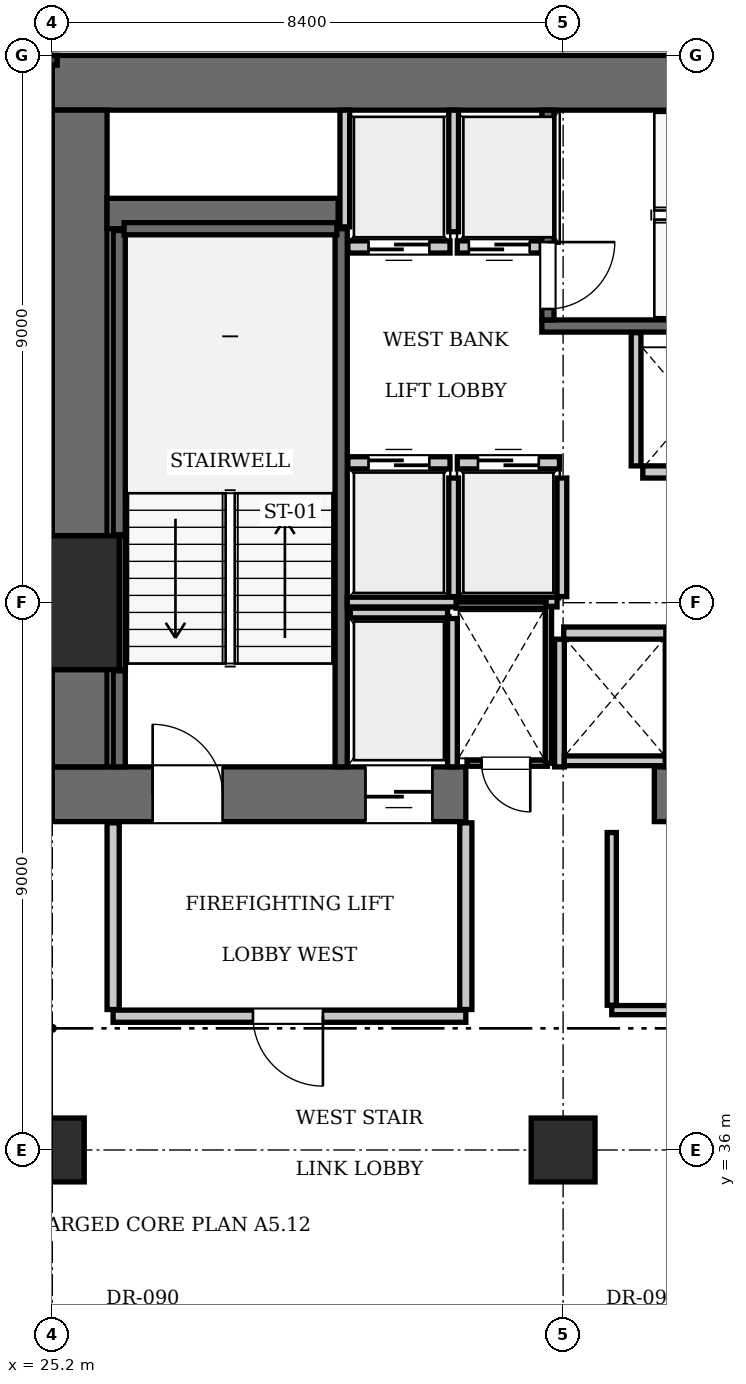
"""IFC4 building model, lengths in metres.
Left out: names, types, materials, properties, quantities, classifications, styles, units other than length and angle.
Written with IfcOpenShell. Run it as: python <this file> out.ifc"""

import sys

from ifc_helpers import new_model, si_unit, direction, frame, frame_2d, origin, origin_2d, place, context, subcontext, project, spatial, rectangle, extrude, element, fill, save


model = new_model("IFC4")
c1 = context("Model", 3, precision=1e-05, world=origin(), true_north=direction((0.0, 1.0)))
c2 = subcontext(c1, "Body", "Model", "MODEL_VIEW")
j1 = project(units=[si_unit("LENGTHUNIT", "METRE"), si_unit("PLANEANGLEUNIT", "RADIAN")], contexts=[c1])
p1 = place(None, origin())
s1 = spatial("IfcSite", under=j1, at=p1, CompositionType="ELEMENT")
p2 = place(p1, origin())
s2 = spatial("IfcBuilding", under=s1, at=p2, CompositionType="ELEMENT")
p3 = place(p2, frame((0.0, 0.0, 42.35)))
s3 = spatial("IfcBuildingStorey", under=s2, at=p3, CompositionType="ELEMENT", Elevation=42.35)
p4 = place(p3, frame((25.2, 45.0, 0.0), z_axis=(0.0, 0.0, 1.0), x_axis=(1.0, 0.0, 0.0)))
e1 = element("IfcColumn", 1, at=p4, inside=s3, PredefinedType="COLUMN", context=c2, shape_type="SweptSolid", body=[
    extrude(rectangle(XDim=2.2, YDim=2.2, at=origin_2d()), origin(), (0.0, 0.0, 1.0), 3.85),
])
p5 = place(p3, frame((25.2, 53.55, 0.0), z_axis=(0.0, 0.0, 1.0), x_axis=(1.0, 0.0, 0.0)))
e2 = element("IfcWall", 2, at=p5, inside=s3, PredefinedType="SHEAR", context=c2, shape_type="SweptSolid", body=[
    extrude(rectangle(XDim=25.2, YDim=0.9, at=frame_2d((12.6, 0.0))), origin(), (0.0, 0.0, 1.0), 3.85),
])
p6 = place(p3, frame((25.2, 41.85, 0.0), z_axis=(0.0, 0.0, 1.0), x_axis=(1.0, 0.0, 0.0)))
e3 = element("IfcWall", 3, at=p6, inside=s3, PredefinedType="SHEAR", context=c2, shape_type="SweptSolid", body=[
    extrude(rectangle(XDim=6.8, YDim=0.9, at=frame_2d((3.4, 0.0))), origin(), (0.0, 0.0, 1.0), 3.85),
])
p7 = place(p6, frame((1.65, 0.0, 0.0)))
e4 = element("IfcOpeningElement", 4, at=p7, cuts=e3, PredefinedType="OPENING", context=c2, shape_type="SweptSolid", body=[
    extrude(rectangle(XDim=1.15, YDim=2.15, at=frame_2d((0.575, 1.075))), frame((0.0, 0.46, 0.0), z_axis=(0.0, -1.0, 0.0), x_axis=(1.0, 0.0, 0.0)), (0.0, 0.0, 1.0), 0.92),
])
p8 = place(p6, frame((5.15, 0.0, 0.0)))
e5 = element("IfcOpeningElement", 5, at=p8, cuts=e3, PredefinedType="OPENING", context=c2, shape_type="SweptSolid", body=[
    extrude(rectangle(XDim=1.1, YDim=2.2, at=frame_2d((0.55, 1.1))), frame((0.0, 0.46, 0.0), z_axis=(0.0, -1.0, 0.0), x_axis=(1.0, 0.0, 0.0)), (0.0, 0.0, 1.0), 0.92),
])
p9 = place(p3, frame((35.1, 41.85, 0.0), z_axis=(0.0, 0.0, 1.0), x_axis=(1.0, 0.0, 0.0)))
e6 = element("IfcWall", 6, at=p9, inside=s3, PredefinedType="SHEAR", context=c2, shape_type="SweptSolid", body=[
    extrude(rectangle(XDim=5.4, YDim=0.9, at=frame_2d((2.7, 0.0))), origin(), (0.0, 0.0, 1.0), 3.85),
])
p10 = place(p3, frame((25.65, 42.3, 0.0), z_axis=(0.0, 0.0, 1.0), x_axis=(0.0, 1.0, 0.0)))
e7 = element("IfcWall", 7, at=p10, inside=s3, PredefinedType="SHEAR", context=c2, shape_type="SweptSolid", body=[
    extrude(rectangle(XDim=1.6, YDim=0.9, at=frame_2d((0.8, 0.0))), origin(), (0.0, 0.0, 1.0), 3.85),
])
p11 = place(p3, frame((25.65, 46.1, 0.0), z_axis=(0.0, 0.0, 1.0), x_axis=(0.0, 1.0, 0.0)))
e8 = element("IfcWall", 8, at=p11, inside=s3, PredefinedType="SHEAR", context=c2, shape_type="SweptSolid", body=[
    extrude(rectangle(XDim=7.0, YDim=0.9, at=frame_2d((3.5, 0.0))), origin(), (0.0, 0.0, 1.0), 3.85),
])
p12 = place(p3, frame((26.1, 51.4, 0.0), z_axis=(0.0, 0.0, 1.0), x_axis=(1.0, 0.0, 0.0)))
e9 = element("IfcWall", 9, at=p12, inside=s3, PredefinedType="SHEAR", context=c2, shape_type="SweptSolid", body=[
    extrude(rectangle(XDim=3.8, YDim=0.5, at=frame_2d((1.9, 0.0))), origin(), (0.0, 0.0, 1.0), 3.85),
])
for number, where, z_axis, x_axis in (
    (10, (25.2, 36.0, 0.0), (0.0, 0.0, 1.0), (1.0, 0.0, 0.0)),
    (11, (33.6, 36.0, 0.0), (0.0, 0.0, 1.0), (1.0, 0.0, 0.0)),
):
    element("IfcColumn", number, at=place(p3, frame(where, z_axis=z_axis, x_axis=x_axis)), inside=s3, PredefinedType="COLUMN", context=c2, shape_type="SweptSolid", body=[
        extrude(rectangle(XDim=1.05, YDim=1.05, at=origin_2d()), origin(), (0.0, 0.0, 1.0), 3.85),
    ])
p13 = place(p3, frame((29.95, 42.3, 0.0), z_axis=(0.0, 0.0, 1.0), x_axis=(0.0, 1.0, 0.0)))
e12 = element("IfcWall", 12, at=p13, inside=s3, PredefinedType="SOLIDWALL", context=c2, shape_type="SweptSolid", body=[
    extrude(rectangle(XDim=8.85, YDim=0.2, at=frame_2d((4.425, 0.0))), origin(), (0.0, 0.0, 1.0), 3.61),
])
p14 = place(p3, frame((26.3, 42.3, 0.0), z_axis=(0.0, 0.0, 1.0), x_axis=(0.0, 1.0, 0.0)))
e13 = element("IfcWall", 13, at=p14, inside=s3, PredefinedType="SOLIDWALL", context=c2, shape_type="SweptSolid", body=[
    extrude(rectangle(XDim=1.58, YDim=0.2, at=frame_2d((0.79, 0.0))), origin(), (0.0, 0.0, 1.0), 3.61),
])
p15 = place(p3, frame((26.3, 46.12, 0.0), z_axis=(0.0, 0.0, 1.0), x_axis=(0.0, 1.0, 0.0)))
e14 = element("IfcWall", 14, at=p15, inside=s3, PredefinedType="SOLIDWALL", context=c2, shape_type="SweptSolid", body=[
    extrude(rectangle(XDim=5.0, YDim=0.2, at=frame_2d((2.5, 0.0))), origin(), (0.0, 0.0, 1.0), 3.61),
])
p16 = place(p3, frame((26.38, 51.15, 0.0), z_axis=(0.0, 0.0, 1.0), x_axis=(1.0, 0.0, 0.0)))
e15 = element("IfcWall", 15, at=p16, inside=s3, PredefinedType="SOLIDWALL", context=c2, shape_type="SweptSolid", body=[
    extrude(rectangle(XDim=3.5, YDim=0.2, at=frame_2d((1.75, 0.0))), origin(), (0.0, 0.0, 1.0), 3.61),
])
p17 = place(p3, frame((26.352, 43.9, 0.0), z_axis=(0.0, 0.0, 1.0), x_axis=(0.0, 1.0, 0.0)))
e16 = element("IfcWall", 16, at=p17, inside=s3, PredefinedType="SOLIDWALL", context=c2, shape_type="SweptSolid", body=[
    extrude(rectangle(XDim=2.2, YDim=0.1, at=frame_2d((1.1, 0.0))), origin(), (0.0, 0.0, 1.0), 3.61),
])
p18 = place(p3, frame((33.25, 49.55, 0.0), z_axis=(0.0, 0.0, 1.0), x_axis=(1.0, 0.0, 0.0)))
e17 = element("IfcWall", 17, at=p18, inside=s3, PredefinedType="SOLIDWALL", context=c2, shape_type="SweptSolid", body=[
    extrude(rectangle(XDim=9.1, YDim=0.2, at=frame_2d((4.55, 0.0))), origin(), (0.0, 0.0, 1.0), 3.61),
])
p19 = place(p3, frame((33.35, 49.65, 0.0), z_axis=(0.0, 0.0, 1.0), x_axis=(0.0, 1.0, 0.0)))
e18 = element("IfcWall", 18, at=p19, inside=s3, PredefinedType="SOLIDWALL", context=c2, shape_type="SweptSolid", body=[
    extrude(rectangle(XDim=3.45, YDim=0.2, at=frame_2d((1.725, 0.0))), origin(), (0.0, 0.0, 1.0), 3.61),
])
p20 = place(p19, frame((0.18, 0.0, 0.0)))
e19 = element("IfcOpeningElement", 19, at=p20, cuts=e18, PredefinedType="OPENING", context=c2, shape_type="SweptSolid", body=[
    extrude(rectangle(XDim=1.1, YDim=2.15, at=frame_2d((0.55, 1.075))), frame((0.0, 0.11, 0.0), z_axis=(0.0, -1.0, 0.0), x_axis=(1.0, 0.0, 0.0)), (0.0, 0.0, 1.0), 0.22),
])
p21 = place(p3, frame((30.06, 47.3, 0.0), z_axis=(0.0, 0.0, 1.0), x_axis=(1.0, 0.0, 0.0)))
e20 = element("IfcWall", 20, at=p21, inside=s3, PredefinedType="SOLIDWALL", context=c2, shape_type="SweptSolid", body=[
    extrude(rectangle(XDim=1.68, YDim=0.2, at=frame_2d((0.84, 0.0))), origin(), (0.0, 0.0, 1.0), 3.61),
])
p22 = place(p21, frame((0.34, 0.0, 0.0)))
e21 = element("IfcOpeningElement", 21, at=p22, cuts=e20, PredefinedType="OPENING", context=c2, shape_type="SweptSolid", body=[
    extrude(rectangle(XDim=1.0, YDim=2.15, at=frame_2d((0.5, 1.075))), frame((0.0, 0.11, 0.0), z_axis=(0.0, -1.0, 0.0), x_axis=(1.0, 0.0, 0.0)), (0.0, 0.0, 1.0), 0.22),
])
p23 = place(p3, frame((31.86, 47.3, 0.0), z_axis=(0.0, 0.0, 1.0), x_axis=(1.0, 0.0, 0.0)))
e22 = element("IfcWall", 22, at=p23, inside=s3, PredefinedType="SOLIDWALL", context=c2, shape_type="SweptSolid", body=[
    extrude(rectangle(XDim=1.68, YDim=0.2, at=frame_2d((0.84, 0.0))), origin(), (0.0, 0.0, 1.0), 3.61),
])
p24 = place(p23, frame((0.34, 0.0, 0.0)))
e23 = element("IfcOpeningElement", 23, at=p24, cuts=e22, PredefinedType="OPENING", context=c2, shape_type="SweptSolid", body=[
    extrude(rectangle(XDim=1.0, YDim=2.15, at=frame_2d((0.5, 1.075))), frame((0.0, 0.11, 0.0), z_axis=(0.0, -1.0, 0.0), x_axis=(1.0, 0.0, 0.0)), (0.0, 0.0, 1.0), 0.22),
])
p25 = place(p3, frame((30.06, 50.85, 0.0), z_axis=(0.0, 0.0, 1.0), x_axis=(1.0, 0.0, 0.0)))
e24 = element("IfcWall", 24, at=p25, inside=s3, PredefinedType="SOLIDWALL", context=c2, shape_type="SweptSolid", body=[
    extrude(rectangle(XDim=1.68, YDim=0.2, at=frame_2d((0.84, 0.0))), origin(), (0.0, 0.0, 1.0), 3.61),
])
p26 = place(p25, frame((0.34, 0.0, 0.0)))
e25 = element("IfcOpeningElement", 25, at=p26, cuts=e24, PredefinedType="OPENING", context=c2, shape_type="SweptSolid", body=[
    extrude(rectangle(XDim=1.0, YDim=2.15, at=frame_2d((0.5, 1.075))), frame((0.0, 0.11, 0.0), z_axis=(0.0, -1.0, 0.0), x_axis=(1.0, 0.0, 0.0)), (0.0, 0.0, 1.0), 0.22),
])
p27 = place(p3, frame((31.86, 50.85, 0.0), z_axis=(0.0, 0.0, 1.0), x_axis=(1.0, 0.0, 0.0)))
e26 = element("IfcWall", 26, at=p27, inside=s3, PredefinedType="SOLIDWALL", context=c2, shape_type="SweptSolid", body=[
    extrude(rectangle(XDim=1.38, YDim=0.2, at=frame_2d((0.69, 0.0))), origin(), (0.0, 0.0, 1.0), 3.61),
])
p28 = place(p27, frame((0.19, 0.0, 0.0)))
e27 = element("IfcOpeningElement", 27, at=p28, cuts=e26, PredefinedType="OPENING", context=c2, shape_type="SweptSolid", body=[
    extrude(rectangle(XDim=1.0, YDim=2.15, at=frame_2d((0.5, 1.075))), frame((0.0, 0.11, 0.0), z_axis=(0.0, -1.0, 0.0), x_axis=(1.0, 0.0, 0.0)), (0.0, 0.0, 1.0), 0.22),
])
p29 = place(p3, frame((34.91, 47.15, 0.0), z_axis=(0.0, 0.0, 1.0), x_axis=(1.0, 0.0, 0.0)))
e28 = element("IfcWall", 28, at=p29, inside=s3, PredefinedType="SOLIDWALL", context=c2, shape_type="SweptSolid", body=[
    extrude(rectangle(XDim=1.68, YDim=0.2, at=frame_2d((0.84, 0.0))), origin(), (0.0, 0.0, 1.0), 3.61),
])
p30 = place(p3, frame((33.61, 44.5, 0.0), z_axis=(0.0, 0.0, 1.0), x_axis=(1.0, 0.0, 0.0)))
e29 = element("IfcWall", 29, at=p30, inside=s3, PredefinedType="SOLIDWALL", context=c2, shape_type="SweptSolid", body=[
    extrude(rectangle(XDim=1.68, YDim=0.2, at=frame_2d((0.84, 0.0))), origin(), (0.0, 0.0, 1.0), 3.61),
])
p31 = place(p3, frame((30.1, 44.83, 0.0), z_axis=(0.0, 0.0, 1.0), x_axis=(1.0, 0.0, 0.0)))
e30 = element("IfcWall", 30, at=p31, inside=s3, PredefinedType="SOLIDWALL", context=c2, shape_type="SweptSolid", body=[
    extrude(rectangle(XDim=1.6, YDim=0.16, at=frame_2d((0.8, 0.0))), origin(), (0.0, 0.0, 1.0), 3.61),
])
p32 = place(p3, frame((31.78, 42.3, 0.0), z_axis=(0.0, 0.0, 1.0), x_axis=(0.0, 1.0, 0.0)))
e31 = element("IfcWall", 31, at=p32, inside=s3, PredefinedType="SOLIDWALL", context=c2, shape_type="SweptSolid", body=[
    extrude(rectangle(XDim=2.44, YDim=0.16, at=frame_2d((1.22, 0.0))), origin(), (0.0, 0.0, 1.0), 3.61),
])
for number, where, z_axis, x_axis in (
    (32, (31.8, 45.1, 0.0), (0.0, 0.0, 1.0), (0.0, 1.0, 0.0)),
    (33, (33.58, 45.1, 0.0), (0.0, 0.0, 1.0), (0.0, 1.0, 0.0)),
):
    element("IfcWall", number, at=place(p3, frame(where, z_axis=z_axis, x_axis=x_axis)), inside=s3, PredefinedType="SOLIDWALL", context=c2, shape_type="SweptSolid", body=[
        extrude(rectangle(XDim=1.95, YDim=0.16, at=frame_2d((0.975, 0.0))), origin(), (0.0, 0.0, 1.0), 3.61),
    ])
p33 = place(p3, frame((30.05, 45.01, 0.0), z_axis=(0.0, 0.0, 1.0), x_axis=(1.0, 0.0, 0.0)))
e34 = element("IfcWall", 34, at=p33, inside=s3, PredefinedType="SOLIDWALL", context=c2, shape_type="SweptSolid", body=[
    extrude(rectangle(XDim=3.45, YDim=0.16, at=frame_2d((1.725, 0.0))), origin(), (0.0, 0.0, 1.0), 3.61),
])
p34 = place(p3, frame((30.01, 51.18, 0.0), z_axis=(0.0, 0.0, 1.0), x_axis=(0.0, 1.0, 0.0)))
e35 = element("IfcWall", 35, at=p34, inside=s3, PredefinedType="SOLIDWALL", context=c2, shape_type="SweptSolid", body=[
    extrude(rectangle(XDim=1.92, YDim=0.16, at=frame_2d((0.96, 0.0))), origin(), (0.0, 0.0, 1.0), 3.61),
])
p35 = place(p3, frame((31.8, 51.1, 0.0), z_axis=(0.0, 0.0, 1.0), x_axis=(0.0, 1.0, 0.0)))
e36 = element("IfcWall", 36, at=p35, inside=s3, PredefinedType="SOLIDWALL", context=c2, shape_type="SweptSolid", body=[
    extrude(rectangle(XDim=2.0, YDim=0.16, at=frame_2d((1.0, 0.0))), origin(), (0.0, 0.0, 1.0), 3.61),
])
p36 = place(p3, frame((34.8, 47.25, 0.0), z_axis=(0.0, 0.0, 1.0), x_axis=(0.0, 1.0, 0.0)))
e37 = element("IfcWall", 37, at=p36, inside=s3, PredefinedType="SOLIDWALL", context=c2, shape_type="SweptSolid", body=[
    extrude(rectangle(XDim=2.19, YDim=0.16, at=frame_2d((1.095, 0.0))), origin(), (0.0, 0.0, 1.0), 3.61),
])
for number, where, z_axis, x_axis in (
    (38, (33.54, 42.3, 0.0), (0.0, 0.0, 1.0), (0.0, 1.0, 0.0)),
    (39, (35.36, 42.3, 0.0), (0.0, 0.0, 1.0), (0.0, 1.0, 0.0)),
):
    element("IfcWall", number, at=place(p3, frame(where, z_axis=z_axis, x_axis=x_axis)), inside=s3, PredefinedType="SOLIDWALL", context=c2, shape_type="SweptSolid", body=[
        extrude(rectangle(XDim=2.1, YDim=0.16, at=frame_2d((1.05, 0.0))), origin(), (0.0, 0.0, 1.0), 3.61),
    ])
p37 = place(p3, frame((33.62, 42.4, 0.0), z_axis=(0.0, 0.0, 1.0), x_axis=(1.0, 0.0, 0.0)))
e40 = element("IfcWall", 40, at=p37, inside=s3, PredefinedType="SOLIDWALL", context=c2, shape_type="SweptSolid", body=[
    extrude(rectangle(XDim=1.66, YDim=0.16, at=frame_2d((0.83, 0.0))), origin(), (0.0, 0.0, 1.0), 3.61),
])
p38 = place(p3, frame((26.2, 38.2, 0.0), z_axis=(0.0, 0.0, 1.0), x_axis=(1.0, 0.0, 0.0)))
e41 = element("IfcWall", 41, at=p38, inside=s3, PredefinedType="PARTITIONING", context=c2, shape_type="SweptSolid", body=[
    extrude(rectangle(XDim=5.8, YDim=0.2, at=frame_2d((2.9, 0.0))), origin(), (0.0, 0.0, 1.0), 3.61),
])
p39 = place(p38, frame((2.3, 0.0, 0.0)))
e42 = element("IfcOpeningElement", 42, at=p39, cuts=e41, PredefinedType="OPENING", context=c2, shape_type="SweptSolid", body=[
    extrude(rectangle(XDim=1.15, YDim=2.15, at=frame_2d((0.575, 1.075))), frame((0.0, 0.11, 0.0), z_axis=(0.0, -1.0, 0.0), x_axis=(1.0, 0.0, 0.0)), (0.0, 0.0, 1.0), 0.22),
])
for number, where, z_axis, x_axis in (
    (43, (26.2, 38.31, 0.0), (0.0, 0.0, 1.0), (0.0, 1.0, 0.0)),
    (44, (32.0, 38.31, 0.0), (0.0, 0.0, 1.0), (0.0, 1.0, 0.0)),
):
    element("IfcWall", number, at=place(p3, frame(where, z_axis=z_axis, x_axis=x_axis)), inside=s3, PredefinedType="PARTITIONING", context=c2, shape_type="SweptSolid", body=[
        extrude(rectangle(XDim=3.07, YDim=0.2, at=frame_2d((1.535, 0.0))), origin(), (0.0, 0.0, 1.0), 3.61),
    ])
p40 = place(p3, frame((32.02, 42.36, 0.0), z_axis=(0.0, 0.0, 1.0), x_axis=(1.0, 0.0, 0.0)))
e45 = element("IfcWall", 45, at=p40, inside=s3, PredefinedType="PARTITIONING", context=c2, shape_type="SweptSolid", body=[
    extrude(rectangle(XDim=1.32, YDim=0.1, at=frame_2d((0.66, 0.0))), origin(), (0.0, 0.0, 1.0), 3.61),
])
p41 = place(p40, frame((0.24, 0.0, 0.0)))
e46 = element("IfcOpeningElement", 46, at=p41, cuts=e45, PredefinedType="OPENING", context=c2, shape_type="SweptSolid", body=[
    extrude(rectangle(XDim=0.8, YDim=2.05, at=frame_2d((0.4, 1.025))), frame((0.0, 0.06, 0.0), z_axis=(0.0, -1.0, 0.0), x_axis=(1.0, 0.0, 0.0)), (0.0, 0.0, 1.0), 0.12),
])
p42 = place(p3, frame((31.84, 44.96, 0.0), z_axis=(0.0, 0.0, 1.0), x_axis=(1.0, 0.0, 0.0)))
e47 = element("IfcWall", 47, at=p42, inside=s3, PredefinedType="PARTITIONING", context=c2, shape_type="SweptSolid", body=[
    extrude(rectangle(XDim=1.48, YDim=0.1, at=frame_2d((0.74, 0.0))), origin(), (0.0, 0.0, 1.0), 3.61),
])
p43 = place(p3, frame((33.36, 42.36, 0.0), z_axis=(0.0, 0.0, 1.0), x_axis=(0.0, 1.0, 0.0)))
e48 = element("IfcWall", 48, at=p43, inside=s3, PredefinedType="PARTITIONING", context=c2, shape_type="SweptSolid", body=[
    extrude(rectangle(XDim=2.58, YDim=0.1, at=frame_2d((1.29, 0.0))), origin(), (0.0, 0.0, 1.0), 3.61),
])
p44 = place(p3, frame((34.4, 38.3, 0.0), z_axis=(0.0, 0.0, 1.0), x_axis=(1.0, 0.0, 0.0)))
e49 = element("IfcWall", 49, at=p44, inside=s3, PredefinedType="PARTITIONING", context=c2, shape_type="SweptSolid", body=[
    extrude(rectangle(XDim=5.92, YDim=0.15, at=frame_2d((2.96, 0.0))), origin(), (0.0, 0.0, 1.0), 3.61),
])
p45 = place(p44, frame((2.4, 0.0, 0.0)))
e50 = element("IfcOpeningElement", 50, at=p45, cuts=e49, PredefinedType="OPENING", context=c2, shape_type="SweptSolid", body=[
    extrude(rectangle(XDim=0.9, YDim=2.1, at=frame_2d((0.45, 1.05))), frame((0.0, 0.085, 0.0), z_axis=(0.0, -1.0, 0.0), x_axis=(1.0, 0.0, 0.0)), (0.0, 0.0, 1.0), 0.17),
])
p46 = place(p3, frame((34.4, 38.38, 0.0), z_axis=(0.0, 0.0, 1.0), x_axis=(0.0, 1.0, 0.0)))
e51 = element("IfcWall", 51, at=p46, inside=s3, PredefinedType="PARTITIONING", context=c2, shape_type="SweptSolid", body=[
    extrude(rectangle(XDim=2.84, YDim=0.15, at=frame_2d((1.42, 0.0))), origin(), (0.0, 0.0, 1.0), 3.61),
])
p47 = place(p7, origin())
e52 = element("IfcDoor", 52, at=p47, inside=s3, OperationType="SINGLE_SWING_LEFT", PredefinedType="DOOR", context=c2, shape_type="SweptSolid", body=[
    extrude(rectangle(XDim=1.15, YDim=2.15, at=frame_2d((0.575, 1.075))), frame((0.0, 0.025, 0.0), z_axis=(0.0, -1.0, 0.0), x_axis=(1.0, 0.0, 0.0)), (0.0, 0.0, 1.0), 0.05),
])
fill(e4, e52)
p48 = place(p20, frame((1.1, 0.0, 0.0), z_axis=(0.0, 0.0, 1.0), x_axis=(-1.0, 0.0, 0.0)))
e53 = element("IfcDoor", 53, at=p48, inside=s3, OperationType="SINGLE_SWING_LEFT", PredefinedType="DOOR", context=c2, shape_type="SweptSolid", body=[
    extrude(rectangle(XDim=1.1, YDim=2.15, at=frame_2d((0.55, 1.075))), frame((0.0, 0.025, 0.0), z_axis=(0.0, -1.0, 0.0), x_axis=(1.0, 0.0, 0.0)), (0.0, 0.0, 1.0), 0.05),
])
fill(e19, e53)
p49 = place(p22, origin())
e54 = element("IfcDoor", 54, at=p49, inside=s3, OperationType="SLIDING_TO_LEFT", PredefinedType="DOOR", context=c2, shape_type="SweptSolid", body=[
    extrude(rectangle(XDim=1.0, YDim=2.15, at=frame_2d((0.5, 1.075))), frame((0.0, 0.025, 0.0), z_axis=(0.0, -1.0, 0.0), x_axis=(1.0, 0.0, 0.0)), (0.0, 0.0, 1.0), 0.05),
])
fill(e21, e54)
p50 = place(p24, origin())
e55 = element("IfcDoor", 55, at=p50, inside=s3, OperationType="SLIDING_TO_LEFT", PredefinedType="DOOR", context=c2, shape_type="SweptSolid", body=[
    extrude(rectangle(XDim=1.0, YDim=2.15, at=frame_2d((0.5, 1.075))), frame((0.0, 0.025, 0.0), z_axis=(0.0, -1.0, 0.0), x_axis=(1.0, 0.0, 0.0)), (0.0, 0.0, 1.0), 0.05),
])
fill(e23, e55)
p51 = place(p26, frame((1.0, 0.0, 0.0), z_axis=(0.0, 0.0, 1.0), x_axis=(-1.0, 0.0, 0.0)))
e56 = element("IfcDoor", 56, at=p51, inside=s3, OperationType="SLIDING_TO_LEFT", PredefinedType="DOOR", context=c2, shape_type="SweptSolid", body=[
    extrude(rectangle(XDim=1.0, YDim=2.15, at=frame_2d((0.5, 1.075))), frame((0.0, 0.025, 0.0), z_axis=(0.0, -1.0, 0.0), x_axis=(1.0, 0.0, 0.0)), (0.0, 0.0, 1.0), 0.05),
])
fill(e25, e56)
p52 = place(p28, frame((1.0, 0.0, 0.0), z_axis=(0.0, 0.0, 1.0), x_axis=(-1.0, 0.0, 0.0)))
e57 = element("IfcDoor", 57, at=p52, inside=s3, OperationType="SLIDING_TO_LEFT", PredefinedType="DOOR", context=c2, shape_type="SweptSolid", body=[
    extrude(rectangle(XDim=1.0, YDim=2.15, at=frame_2d((0.5, 1.075))), frame((0.0, 0.025, 0.0), z_axis=(0.0, -1.0, 0.0), x_axis=(1.0, 0.0, 0.0)), (0.0, 0.0, 1.0), 0.05),
])
fill(e27, e57)
p53 = place(p8, frame((1.1, 0.0, 0.0), z_axis=(0.0, 0.0, 1.0), x_axis=(-1.0, 0.0, 0.0)))
e58 = element("IfcDoor", 58, at=p53, inside=s3, OperationType="SLIDING_TO_LEFT", PredefinedType="DOOR", context=c2, shape_type="SweptSolid", body=[
    extrude(rectangle(XDim=1.1, YDim=2.2, at=frame_2d((0.55, 1.1))), frame((0.0, 0.025, 0.0), z_axis=(0.0, -1.0, 0.0), x_axis=(1.0, 0.0, 0.0)), (0.0, 0.0, 1.0), 0.05),
])
fill(e5, e58)
p54 = place(p39, frame((1.15, 0.0, 0.0), z_axis=(0.0, 0.0, 1.0), x_axis=(-1.0, 0.0, 0.0)))
e59 = element("IfcDoor", 59, at=p54, inside=s3, OperationType="SINGLE_SWING_LEFT", PredefinedType="DOOR", context=c2, shape_type="SweptSolid", body=[
    extrude(rectangle(XDim=1.15, YDim=2.15, at=frame_2d((0.575, 1.075))), frame((0.0, 0.025, 0.0), z_axis=(0.0, -1.0, 0.0), x_axis=(1.0, 0.0, 0.0)), (0.0, 0.0, 1.0), 0.05),
])
fill(e42, e59)
p55 = place(p41, frame((0.8, 0.0, 0.0), z_axis=(0.0, 0.0, 1.0), x_axis=(-1.0, 0.0, 0.0)))
e60 = element("IfcDoor", 60, at=p55, inside=s3, OperationType="SINGLE_SWING_LEFT", PredefinedType="DOOR", context=c2, shape_type="SweptSolid", body=[
    extrude(rectangle(XDim=0.8, YDim=2.05, at=frame_2d((0.4, 1.025))), frame((0.0, 0.025, 0.0), z_axis=(0.0, -1.0, 0.0), x_axis=(1.0, 0.0, 0.0)), (0.0, 0.0, 1.0), 0.05),
])
fill(e46, e60)
save(model, sys.argv[1])
